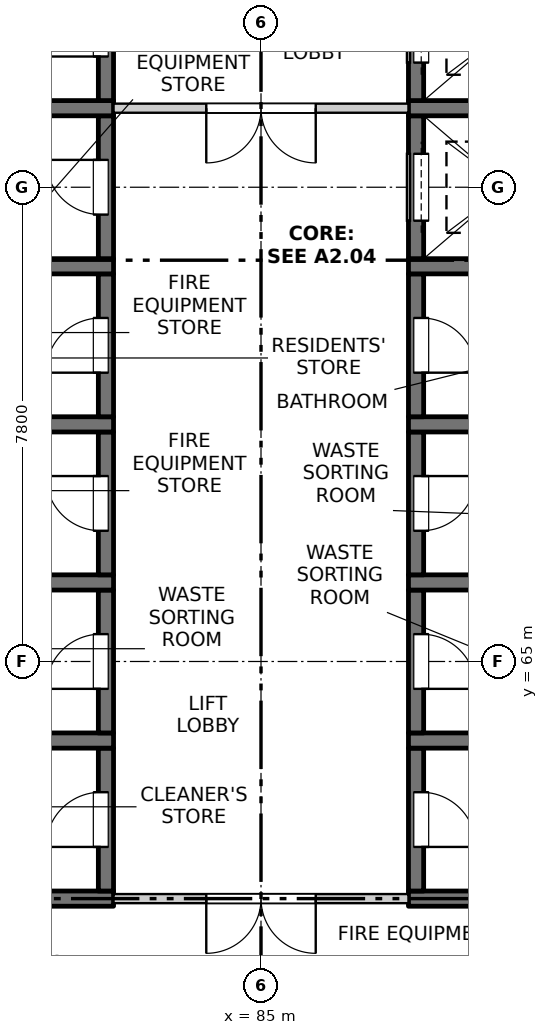
"""IFC4 building model, lengths in metres.
Left out: names, types, materials, properties, quantities, classifications, styles, units other than length and angle.
Written with IfcOpenShell. Run it as: python <this file> out.ifc"""

import sys

from ifc_helpers import new_model, si_unit, direction, frame, frame_2d, origin, place, context, subcontext, project, spatial, rectangle, extrude, element, fill, save


model = new_model("IFC4")
c1 = context("Model", 3, precision=1e-05, world=origin(), true_north=direction((0.0, 1.0)))
c2 = subcontext(c1, "Body", "Model", "MODEL_VIEW")
j1 = project(units=[si_unit("LENGTHUNIT", "METRE"), si_unit("PLANEANGLEUNIT", "RADIAN")], contexts=[c1])
p1 = place(None, origin())
s1 = spatial("IfcSite", under=j1, at=p1, CompositionType="ELEMENT")
p2 = place(p1, origin())
s2 = spatial("IfcBuilding", under=s1, at=p2, CompositionType="ELEMENT")
p3 = place(p2, frame((0.0, 0.0, 214.3)))
s3 = spatial("IfcBuildingStorey", under=s2, at=p3, CompositionType="ELEMENT", Elevation=214.3)
p4 = place(p3, frame((79.575, 61.1, -0.25), z_axis=(0.0, 0.0, 1.0), x_axis=(1.0, 0.0, 0.0)))
e1 = element("IfcWall", 1, at=p4, inside=s3, PredefinedType="SOLIDWALL", context=c2, shape_type="SweptSolid", body=[
    extrude(rectangle(XDim=3.0, YDim=0.25, at=frame_2d((1.5, 0.0))), origin(), (0.0, 0.0, 1.0), 3.4),
])
p5 = place(p3, frame((82.45, 61.225, -0.25), z_axis=(0.0, 0.0, 1.0), x_axis=(0.0, 1.0, 0.0)))
e2 = element("IfcWall", 2, at=p5, inside=s3, PredefinedType="SOLIDWALL", context=c2, shape_type="SweptSolid", body=[
    extrude(rectangle(XDim=2.35, YDim=0.25, at=frame_2d((1.175, 0.0))), origin(), (0.0, 0.0, 1.0), 3.4),
])
p6 = place(p5, frame((0.725, 0.0, 0.25)))
e3 = element("IfcOpeningElement", 3, at=p6, cuts=e2, PredefinedType="OPENING", context=c2, shape_type="SweptSolid", body=[
    extrude(rectangle(XDim=0.9, YDim=2.1, at=frame_2d((0.45, 1.05))), frame((0.0, 0.135, 0.0), z_axis=(0.0, -1.0, 0.0), x_axis=(1.0, 0.0, 0.0)), (0.0, 0.0, 1.0), 0.27),
])
p7 = place(p3, frame((79.575, 63.7, -0.25), z_axis=(0.0, 0.0, 1.0), x_axis=(1.0, 0.0, 0.0)))
e4 = element("IfcWall", 4, at=p7, inside=s3, PredefinedType="SOLIDWALL", context=c2, shape_type="SweptSolid", body=[
    extrude(rectangle(XDim=3.0, YDim=0.25, at=frame_2d((1.5, 0.0))), origin(), (0.0, 0.0, 1.0), 3.4),
])
p8 = place(p3, frame((82.45, 63.825, -0.25), z_axis=(0.0, 0.0, 1.0), x_axis=(0.0, 1.0, 0.0)))
e5 = element("IfcWall", 5, at=p8, inside=s3, PredefinedType="SOLIDWALL", context=c2, shape_type="SweptSolid", body=[
    extrude(rectangle(XDim=2.35, YDim=0.25, at=frame_2d((1.175, 0.0))), origin(), (0.0, 0.0, 1.0), 3.4),
])
p9 = place(p8, frame((0.725, 0.0, 0.25)))
e6 = element("IfcOpeningElement", 6, at=p9, cuts=e5, PredefinedType="OPENING", context=c2, shape_type="SweptSolid", body=[
    extrude(rectangle(XDim=0.9, YDim=2.1, at=frame_2d((0.45, 1.05))), frame((0.0, 0.135, 0.0), z_axis=(0.0, -1.0, 0.0), x_axis=(1.0, 0.0, 0.0)), (0.0, 0.0, 1.0), 0.27),
])
p10 = place(p3, frame((79.575, 66.3, -0.25), z_axis=(0.0, 0.0, 1.0), x_axis=(1.0, 0.0, 0.0)))
e7 = element("IfcWall", 7, at=p10, inside=s3, PredefinedType="SOLIDWALL", context=c2, shape_type="SweptSolid", body=[
    extrude(rectangle(XDim=3.0, YDim=0.25, at=frame_2d((1.5, 0.0))), origin(), (0.0, 0.0, 1.0), 3.4),
])
p11 = place(p3, frame((82.45, 66.425, -0.25), z_axis=(0.0, 0.0, 1.0), x_axis=(0.0, 1.0, 0.0)))
e8 = element("IfcWall", 8, at=p11, inside=s3, PredefinedType="SOLIDWALL", context=c2, shape_type="SweptSolid", body=[
    extrude(rectangle(XDim=2.35, YDim=0.25, at=frame_2d((1.175, 0.0))), origin(), (0.0, 0.0, 1.0), 3.4),
])
p12 = place(p11, frame((0.725, 0.0, 0.25)))
e9 = element("IfcOpeningElement", 9, at=p12, cuts=e8, PredefinedType="OPENING", context=c2, shape_type="SweptSolid", body=[
    extrude(rectangle(XDim=0.9, YDim=2.1, at=frame_2d((0.45, 1.05))), frame((0.0, 0.135, 0.0), z_axis=(0.0, -1.0, 0.0), x_axis=(1.0, 0.0, 0.0)), (0.0, 0.0, 1.0), 0.27),
])
p13 = place(p3, frame((79.575, 68.9, -0.25), z_axis=(0.0, 0.0, 1.0), x_axis=(1.0, 0.0, 0.0)))
e10 = element("IfcWall", 10, at=p13, inside=s3, PredefinedType="SOLIDWALL", context=c2, shape_type="SweptSolid", body=[
    extrude(rectangle(XDim=3.0, YDim=0.25, at=frame_2d((1.5, 0.0))), origin(), (0.0, 0.0, 1.0), 3.4),
])
p14 = place(p3, frame((82.45, 69.025, -0.25), z_axis=(0.0, 0.0, 1.0), x_axis=(0.0, 1.0, 0.0)))
e11 = element("IfcWall", 11, at=p14, inside=s3, PredefinedType="SOLIDWALL", context=c2, shape_type="SweptSolid", body=[
    extrude(rectangle(XDim=2.35, YDim=0.25, at=frame_2d((1.175, 0.0))), origin(), (0.0, 0.0, 1.0), 3.4),
])
p15 = place(p14, frame((0.725, 0.0, 0.25)))
e12 = element("IfcOpeningElement", 12, at=p15, cuts=e11, PredefinedType="OPENING", context=c2, shape_type="SweptSolid", body=[
    extrude(rectangle(XDim=0.9, YDim=2.1, at=frame_2d((0.45, 1.05))), frame((0.0, 0.135, 0.0), z_axis=(0.0, -1.0, 0.0), x_axis=(1.0, 0.0, 0.0)), (0.0, 0.0, 1.0), 0.27),
])
p16 = place(p3, frame((79.575, 71.5, -0.25), z_axis=(0.0, 0.0, 1.0), x_axis=(1.0, 0.0, 0.0)))
e13 = element("IfcWall", 13, at=p16, inside=s3, PredefinedType="SOLIDWALL", context=c2, shape_type="SweptSolid", body=[
    extrude(rectangle(XDim=3.0, YDim=0.25, at=frame_2d((1.5, 0.0))), origin(), (0.0, 0.0, 1.0), 3.4),
])
p17 = place(p3, frame((82.45, 71.625, -0.25), z_axis=(0.0, 0.0, 1.0), x_axis=(0.0, 1.0, 0.0)))
e14 = element("IfcWall", 14, at=p17, inside=s3, PredefinedType="SOLIDWALL", context=c2, shape_type="SweptSolid", body=[
    extrude(rectangle(XDim=2.35, YDim=0.25, at=frame_2d((1.175, 0.0))), origin(), (0.0, 0.0, 1.0), 3.4),
])
p18 = place(p17, frame((0.725, 0.0, 0.25)))
e15 = element("IfcOpeningElement", 15, at=p18, cuts=e14, PredefinedType="OPENING", context=c2, shape_type="SweptSolid", body=[
    extrude(rectangle(XDim=0.9, YDim=2.1, at=frame_2d((0.45, 1.05))), frame((0.0, 0.135, 0.0), z_axis=(0.0, -1.0, 0.0), x_axis=(1.0, 0.0, 0.0)), (0.0, 0.0, 1.0), 0.27),
])
p19 = place(p3, frame((79.575, 74.1, -0.25), z_axis=(0.0, 0.0, 1.0), x_axis=(1.0, 0.0, 0.0)))
e16 = element("IfcWall", 16, at=p19, inside=s3, PredefinedType="SOLIDWALL", context=c2, shape_type="SweptSolid", body=[
    extrude(rectangle(XDim=3.0, YDim=0.25, at=frame_2d((1.5, 0.0))), origin(), (0.0, 0.0, 1.0), 3.4),
])
p20 = place(p3, frame((82.45, 74.225, -0.25), z_axis=(0.0, 0.0, 1.0), x_axis=(0.0, 1.0, 0.0)))
e17 = element("IfcWall", 17, at=p20, inside=s3, PredefinedType="SOLIDWALL", context=c2, shape_type="SweptSolid", body=[
    extrude(rectangle(XDim=2.35, YDim=0.25, at=frame_2d((1.175, 0.0))), origin(), (0.0, 0.0, 1.0), 3.4),
])
p21 = place(p20, frame((0.725, 0.0, 0.25)))
e18 = element("IfcOpeningElement", 18, at=p21, cuts=e17, PredefinedType="OPENING", context=c2, shape_type="SweptSolid", body=[
    extrude(rectangle(XDim=0.9, YDim=2.1, at=frame_2d((0.45, 1.05))), frame((0.0, 0.135, 0.0), z_axis=(0.0, -1.0, 0.0), x_axis=(1.0, 0.0, 0.0)), (0.0, 0.0, 1.0), 0.27),
])
p22 = place(p3, frame((87.425, 61.1, -0.25), z_axis=(0.0, 0.0, 1.0), x_axis=(1.0, 0.0, 0.0)))
e19 = element("IfcWall", 19, at=p22, inside=s3, PredefinedType="SOLIDWALL", context=c2, shape_type="SweptSolid", body=[
    extrude(rectangle(XDim=3.0, YDim=0.25, at=frame_2d((1.5, 0.0))), origin(), (0.0, 0.0, 1.0), 3.4),
])
p23 = place(p3, frame((87.55, 61.225, -0.25), z_axis=(0.0, 0.0, 1.0), x_axis=(0.0, 1.0, 0.0)))
e20 = element("IfcWall", 20, at=p23, inside=s3, PredefinedType="SOLIDWALL", context=c2, shape_type="SweptSolid", body=[
    extrude(rectangle(XDim=2.35, YDim=0.25, at=frame_2d((1.175, 0.0))), origin(), (0.0, 0.0, 1.0), 3.4),
])
p24 = place(p23, frame((0.725, 0.0, 0.25)))
e21 = element("IfcOpeningElement", 21, at=p24, cuts=e20, PredefinedType="OPENING", context=c2, shape_type="SweptSolid", body=[
    extrude(rectangle(XDim=0.9, YDim=2.1, at=frame_2d((0.45, 1.05))), frame((0.0, 0.135, 0.0), z_axis=(0.0, -1.0, 0.0), x_axis=(1.0, 0.0, 0.0)), (0.0, 0.0, 1.0), 0.27),
])
p25 = place(p3, frame((87.425, 63.7, -0.25), z_axis=(0.0, 0.0, 1.0), x_axis=(1.0, 0.0, 0.0)))
e22 = element("IfcWall", 22, at=p25, inside=s3, PredefinedType="SOLIDWALL", context=c2, shape_type="SweptSolid", body=[
    extrude(rectangle(XDim=3.0, YDim=0.25, at=frame_2d((1.5, 0.0))), origin(), (0.0, 0.0, 1.0), 3.4),
])
p26 = place(p3, frame((87.55, 63.825, -0.25), z_axis=(0.0, 0.0, 1.0), x_axis=(0.0, 1.0, 0.0)))
e23 = element("IfcWall", 23, at=p26, inside=s3, PredefinedType="SOLIDWALL", context=c2, shape_type="SweptSolid", body=[
    extrude(rectangle(XDim=2.35, YDim=0.25, at=frame_2d((1.175, 0.0))), origin(), (0.0, 0.0, 1.0), 3.4),
])
p27 = place(p26, frame((0.725, 0.0, 0.25)))
e24 = element("IfcOpeningElement", 24, at=p27, cuts=e23, PredefinedType="OPENING", context=c2, shape_type="SweptSolid", body=[
    extrude(rectangle(XDim=0.9, YDim=2.1, at=frame_2d((0.45, 1.05))), frame((0.0, 0.135, 0.0), z_axis=(0.0, -1.0, 0.0), x_axis=(1.0, 0.0, 0.0)), (0.0, 0.0, 1.0), 0.27),
])
p28 = place(p3, frame((87.425, 66.3, -0.25), z_axis=(0.0, 0.0, 1.0), x_axis=(1.0, 0.0, 0.0)))
e25 = element("IfcWall", 25, at=p28, inside=s3, PredefinedType="SOLIDWALL", context=c2, shape_type="SweptSolid", body=[
    extrude(rectangle(XDim=3.0, YDim=0.25, at=frame_2d((1.5, 0.0))), origin(), (0.0, 0.0, 1.0), 3.4),
])
p29 = place(p3, frame((87.55, 66.425, -0.25), z_axis=(0.0, 0.0, 1.0), x_axis=(0.0, 1.0, 0.0)))
e26 = element("IfcWall", 26, at=p29, inside=s3, PredefinedType="SOLIDWALL", context=c2, shape_type="SweptSolid", body=[
    extrude(rectangle(XDim=2.35, YDim=0.25, at=frame_2d((1.175, 0.0))), origin(), (0.0, 0.0, 1.0), 3.4),
])
p30 = place(p29, frame((0.725, 0.0, 0.25)))
e27 = element("IfcOpeningElement", 27, at=p30, cuts=e26, PredefinedType="OPENING", context=c2, shape_type="SweptSolid", body=[
    extrude(rectangle(XDim=0.9, YDim=2.1, at=frame_2d((0.45, 1.05))), frame((0.0, 0.135, 0.0), z_axis=(0.0, -1.0, 0.0), x_axis=(1.0, 0.0, 0.0)), (0.0, 0.0, 1.0), 0.27),
])
p31 = place(p3, frame((87.425, 68.9, -0.25), z_axis=(0.0, 0.0, 1.0), x_axis=(1.0, 0.0, 0.0)))
e28 = element("IfcWall", 28, at=p31, inside=s3, PredefinedType="SOLIDWALL", context=c2, shape_type="SweptSolid", body=[
    extrude(rectangle(XDim=3.0, YDim=0.25, at=frame_2d((1.5, 0.0))), origin(), (0.0, 0.0, 1.0), 3.4),
])
p32 = place(p3, frame((87.55, 69.025, -0.25), z_axis=(0.0, 0.0, 1.0), x_axis=(0.0, 1.0, 0.0)))
e29 = element("IfcWall", 29, at=p32, inside=s3, PredefinedType="SOLIDWALL", context=c2, shape_type="SweptSolid", body=[
    extrude(rectangle(XDim=2.35, YDim=0.25, at=frame_2d((1.175, 0.0))), origin(), (0.0, 0.0, 1.0), 3.4),
])
p33 = place(p32, frame((0.725, 0.0, 0.25)))
e30 = element("IfcOpeningElement", 30, at=p33, cuts=e29, PredefinedType="OPENING", context=c2, shape_type="SweptSolid", body=[
    extrude(rectangle(XDim=0.9, YDim=2.1, at=frame_2d((0.45, 1.05))), frame((0.0, 0.135, 0.0), z_axis=(0.0, -1.0, 0.0), x_axis=(1.0, 0.0, 0.0)), (0.0, 0.0, 1.0), 0.27),
])
p34 = place(p3, frame((87.425, 71.5, -0.25), z_axis=(0.0, 0.0, 1.0), x_axis=(1.0, 0.0, 0.0)))
e31 = element("IfcWall", 31, at=p34, inside=s3, PredefinedType="SOLIDWALL", context=c2, shape_type="SweptSolid", body=[
    extrude(rectangle(XDim=3.0, YDim=0.25, at=frame_2d((1.5, 0.0))), origin(), (0.0, 0.0, 1.0), 3.4),
])
p35 = place(p3, frame((87.55, 71.625, -0.25), z_axis=(0.0, 0.0, 1.0), x_axis=(0.0, 1.0, 0.0)))
e32 = element("IfcWall", 32, at=p35, inside=s3, PredefinedType="SOLIDWALL", context=c2, shape_type="SweptSolid", body=[
    extrude(rectangle(XDim=2.35, YDim=0.25, at=frame_2d((1.175, 0.0))), origin(), (0.0, 0.0, 1.0), 3.4),
])
p36 = place(p35, frame((0.625, 0.0, 0.25)))
e33 = element("IfcOpeningElement", 33, at=p36, cuts=e32, PredefinedType="OPENING", context=c2, shape_type="SweptSolid", body=[
    extrude(rectangle(XDim=1.1, YDim=2.1, at=frame_2d((0.55, 1.05))), frame((0.0, 0.135, 0.0), z_axis=(0.0, -1.0, 0.0), x_axis=(1.0, 0.0, 0.0)), (0.0, 0.0, 1.0), 0.27),
])
p37 = place(p3, frame((87.425, 74.1, -0.25), z_axis=(0.0, 0.0, 1.0), x_axis=(1.0, 0.0, 0.0)))
e34 = element("IfcWall", 34, at=p37, inside=s3, PredefinedType="SOLIDWALL", context=c2, shape_type="SweptSolid", body=[
    extrude(rectangle(XDim=3.0, YDim=0.25, at=frame_2d((1.5, 0.0))), origin(), (0.0, 0.0, 1.0), 3.4),
])
p38 = place(p3, frame((87.55, 74.225, -0.25), z_axis=(0.0, 0.0, 1.0), x_axis=(0.0, 1.0, 0.0)))
e35 = element("IfcWall", 35, at=p38, inside=s3, PredefinedType="SOLIDWALL", context=c2, shape_type="SweptSolid", body=[
    extrude(rectangle(XDim=2.35, YDim=0.25, at=frame_2d((1.175, 0.0))), origin(), (0.0, 0.0, 1.0), 3.4),
])
p39 = place(p38, frame((0.625, 0.0, 0.25)))
e36 = element("IfcOpeningElement", 36, at=p39, cuts=e35, PredefinedType="OPENING", context=c2, shape_type="SweptSolid", body=[
    extrude(rectangle(XDim=1.1, YDim=2.1, at=frame_2d((0.55, 1.05))), frame((0.0, 0.135, 0.0), z_axis=(0.0, -1.0, 0.0), x_axis=(1.0, 0.0, 0.0)), (0.0, 0.0, 1.0), 0.27),
])
p40 = place(p3, frame((82.575, 61.1, 0.0), z_axis=(0.0, 0.0, 1.0), x_axis=(1.0, 0.0, 0.0)))
e37 = element("IfcWall", 37, at=p40, inside=s3, PredefinedType="PARTITIONING", context=c2, shape_type="SweptSolid", body=[
    extrude(rectangle(XDim=4.85, YDim=0.15, at=frame_2d((2.425, 0.0))), origin(), (0.0, 0.0, 1.0), 3.15),
])
p41 = place(p40, frame((1.525, 0.0, 0.0)))
e38 = element("IfcOpeningElement", 38, at=p41, cuts=e37, PredefinedType="OPENING", context=c2, shape_type="SweptSolid", body=[
    extrude(rectangle(XDim=1.8, YDim=2.1, at=frame_2d((0.9, 1.05))), frame((0.0, 0.085, 0.0), z_axis=(0.0, -1.0, 0.0), x_axis=(1.0, 0.0, 0.0)), (0.0, 0.0, 1.0), 0.17),
])
p42 = place(p3, frame((82.575, 74.1, 0.0), z_axis=(0.0, 0.0, 1.0), x_axis=(1.0, 0.0, 0.0)))
e39 = element("IfcWall", 39, at=p42, inside=s3, PredefinedType="PARTITIONING", context=c2, shape_type="SweptSolid", body=[
    extrude(rectangle(XDim=4.85, YDim=0.15, at=frame_2d((2.425, 0.0))), origin(), (0.0, 0.0, 1.0), 3.15),
])
p43 = place(p42, frame((1.525, 0.0, 0.0)))
e40 = element("IfcOpeningElement", 40, at=p43, cuts=e39, PredefinedType="OPENING", context=c2, shape_type="SweptSolid", body=[
    extrude(rectangle(XDim=1.8, YDim=2.1, at=frame_2d((0.9, 1.05))), frame((0.0, 0.085, 0.0), z_axis=(0.0, -1.0, 0.0), x_axis=(1.0, 0.0, 0.0)), (0.0, 0.0, 1.0), 0.17),
])
p44 = place(p41, origin())
e41 = element("IfcDoor", 41, at=p44, inside=s3, OperationType="DOUBLE_DOOR_SINGLE_SWING", PredefinedType="DOOR", context=c2, shape_type="SweptSolid", body=[
    extrude(rectangle(XDim=1.8, YDim=2.1, at=frame_2d((0.9, 1.05))), frame((0.0, 0.025, 0.0), z_axis=(0.0, -1.0, 0.0), x_axis=(1.0, 0.0, 0.0)), (0.0, 0.0, 1.0), 0.05),
])
fill(e38, e41)
p45 = place(p6, origin())
e42 = element("IfcDoor", 42, at=p45, inside=s3, OperationType="SINGLE_SWING_LEFT", PredefinedType="DOOR", context=c2, shape_type="SweptSolid", body=[
    extrude(rectangle(XDim=0.9, YDim=2.1, at=frame_2d((0.45, 1.05))), frame((0.0, 0.11, 0.0), z_axis=(0.0, -1.0, 0.0), x_axis=(1.0, 0.0, 0.0)), (0.0, 0.0, 1.0), 0.05),
])
fill(e3, e42)
p46 = place(p24, origin())
e43 = element("IfcDoor", 43, at=p46, inside=s3, OperationType="SINGLE_SWING_RIGHT", PredefinedType="DOOR", context=c2, shape_type="SweptSolid", body=[
    extrude(rectangle(XDim=0.9, YDim=2.1, at=frame_2d((0.45, 1.05))), frame((0.0, -0.06, 0.0), z_axis=(0.0, -1.0, 0.0), x_axis=(1.0, 0.0, 0.0)), (0.0, 0.0, 1.0), 0.05),
])
fill(e21, e43)
p47 = place(p9, origin())
e44 = element("IfcDoor", 44, at=p47, inside=s3, OperationType="SINGLE_SWING_LEFT", PredefinedType="DOOR", context=c2, shape_type="SweptSolid", body=[
    extrude(rectangle(XDim=0.9, YDim=2.1, at=frame_2d((0.45, 1.05))), frame((0.0, 0.11, 0.0), z_axis=(0.0, -1.0, 0.0), x_axis=(1.0, 0.0, 0.0)), (0.0, 0.0, 1.0), 0.05),
])
fill(e6, e44)
p48 = place(p27, origin())
e45 = element("IfcDoor", 45, at=p48, inside=s3, OperationType="SINGLE_SWING_RIGHT", PredefinedType="DOOR", context=c2, shape_type="SweptSolid", body=[
    extrude(rectangle(XDim=0.9, YDim=2.1, at=frame_2d((0.45, 1.05))), frame((0.0, -0.06, 0.0), z_axis=(0.0, -1.0, 0.0), x_axis=(1.0, 0.0, 0.0)), (0.0, 0.0, 1.0), 0.05),
])
fill(e24, e45)
p49 = place(p12, origin())
e46 = element("IfcDoor", 46, at=p49, inside=s3, OperationType="SINGLE_SWING_RIGHT", PredefinedType="DOOR", context=c2, shape_type="SweptSolid", body=[
    extrude(rectangle(XDim=0.9, YDim=2.1, at=frame_2d((0.45, 1.05))), frame((0.0, 0.11, 0.0), z_axis=(0.0, -1.0, 0.0), x_axis=(1.0, 0.0, 0.0)), (0.0, 0.0, 1.0), 0.05),
])
fill(e9, e46)
p50 = place(p30, origin())
e47 = element("IfcDoor", 47, at=p50, inside=s3, OperationType="SINGLE_SWING_LEFT", PredefinedType="DOOR", context=c2, shape_type="SweptSolid", body=[
    extrude(rectangle(XDim=0.9, YDim=2.1, at=frame_2d((0.45, 1.05))), frame((0.0, -0.06, 0.0), z_axis=(0.0, -1.0, 0.0), x_axis=(1.0, 0.0, 0.0)), (0.0, 0.0, 1.0), 0.05),
])
fill(e27, e47)
p51 = place(p15, origin())
e48 = element("IfcDoor", 48, at=p51, inside=s3, OperationType="SINGLE_SWING_LEFT", PredefinedType="DOOR", context=c2, shape_type="SweptSolid", body=[
    extrude(rectangle(XDim=0.9, YDim=2.1, at=frame_2d((0.45, 1.05))), frame((0.0, 0.11, 0.0), z_axis=(0.0, -1.0, 0.0), x_axis=(1.0, 0.0, 0.0)), (0.0, 0.0, 1.0), 0.05),
])
fill(e12, e48)
p52 = place(p33, origin())
e49 = element("IfcDoor", 49, at=p52, inside=s3, OperationType="SINGLE_SWING_RIGHT", PredefinedType="DOOR", context=c2, shape_type="SweptSolid", body=[
    extrude(rectangle(XDim=0.9, YDim=2.1, at=frame_2d((0.45, 1.05))), frame((0.0, -0.06, 0.0), z_axis=(0.0, -1.0, 0.0), x_axis=(1.0, 0.0, 0.0)), (0.0, 0.0, 1.0), 0.05),
])
fill(e30, e49)
p53 = place(p18, origin())
e50 = element("IfcDoor", 50, at=p53, inside=s3, OperationType="SINGLE_SWING_RIGHT", PredefinedType="DOOR", context=c2, shape_type="SweptSolid", body=[
    extrude(rectangle(XDim=0.9, YDim=2.1, at=frame_2d((0.45, 1.05))), frame((0.0, 0.11, 0.0), z_axis=(0.0, -1.0, 0.0), x_axis=(1.0, 0.0, 0.0)), (0.0, 0.0, 1.0), 0.05),
])
fill(e15, e50)
p54 = place(p36, origin())
e51 = element("IfcDoor", 51, at=p54, inside=s3, OperationType="SLIDING_TO_LEFT", PredefinedType="DOOR", context=c2, shape_type="SweptSolid", body=[
    extrude(rectangle(XDim=1.1, YDim=2.1, at=frame_2d((0.55, 1.05))), frame((0.0, -0.06, 0.0), z_axis=(0.0, -1.0, 0.0), x_axis=(1.0, 0.0, 0.0)), (0.0, 0.0, 1.0), 0.05),
])
fill(e33, e51)
p55 = place(p43, origin())
e52 = element("IfcDoor", 52, at=p55, inside=s3, OperationType="DOUBLE_DOOR_SINGLE_SWING", PredefinedType="DOOR", context=c2, shape_type="SweptSolid", body=[
    extrude(rectangle(XDim=1.8, YDim=2.1, at=frame_2d((0.9, 1.05))), frame((0.0, 0.025, 0.0), z_axis=(0.0, -1.0, 0.0), x_axis=(1.0, 0.0, 0.0)), (0.0, 0.0, 1.0), 0.05),
])
fill(e40, e52)
p56 = place(p21, origin())
e53 = element("IfcDoor", 53, at=p56, inside=s3, OperationType="SINGLE_SWING_LEFT", PredefinedType="DOOR", context=c2, shape_type="SweptSolid", body=[
    extrude(rectangle(XDim=0.9, YDim=2.1, at=frame_2d((0.45, 1.05))), frame((0.0, 0.11, 0.0), z_axis=(0.0, -1.0, 0.0), x_axis=(1.0, 0.0, 0.0)), (0.0, 0.0, 1.0), 0.05),
])
fill(e18, e53)
p57 = place(p39, origin())
e54 = element("IfcDoor", 54, at=p57, inside=s3, OperationType="SLIDING_TO_LEFT", PredefinedType="DOOR", context=c2, shape_type="SweptSolid", body=[
    extrude(rectangle(XDim=1.1, YDim=2.1, at=frame_2d((0.55, 1.05))), frame((0.0, -0.06, 0.0), z_axis=(0.0, -1.0, 0.0), x_axis=(1.0, 0.0, 0.0)), (0.0, 0.0, 1.0), 0.05),
])
fill(e36, e54)
save(model, sys.argv[1])
